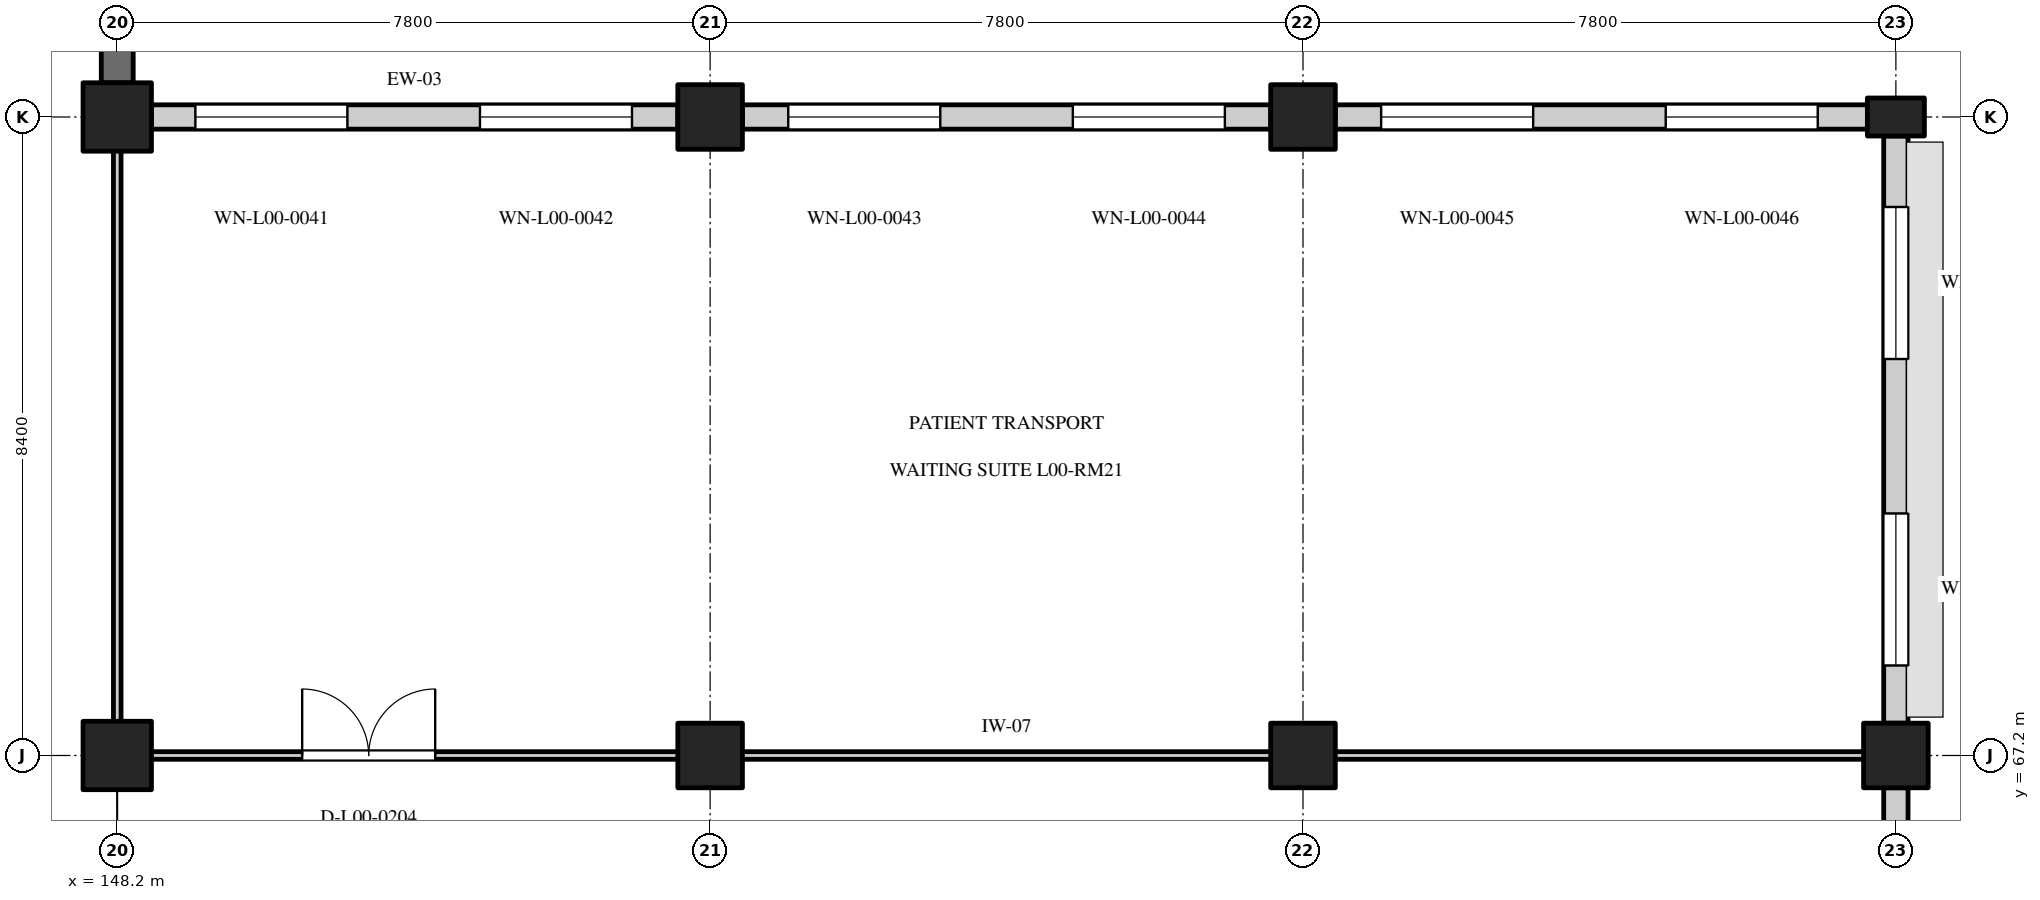
"""IFC4 building model, lengths in metres.
Left out: names, types, materials, properties, quantities, classifications, styles, units other than length and angle.
Written with IfcOpenShell. Run it as: python <this file> out.ifc"""

import sys

from ifc_helpers import new_model, si_unit, direction, frame, frame_2d, origin, origin_2d, place, context, subcontext, project, spatial, rectangle, extrude, element, fill, save


model = new_model("IFC4")
c1 = context("Model", 3, precision=1e-05, world=origin(), true_north=direction((0.0, 1.0)))
c2 = subcontext(c1, "Body", "Model", "MODEL_VIEW")
j1 = project(units=[si_unit("LENGTHUNIT", "METRE"), si_unit("PLANEANGLEUNIT", "RADIAN")], contexts=[c1])
p1 = place(None, origin())
s1 = spatial("IfcSite", under=j1, at=p1, CompositionType="ELEMENT")
p2 = place(p1, origin())
s2 = spatial("IfcBuilding", under=s1, at=p2, CompositionType="ELEMENT")
p3 = place(p2, origin())
s3 = spatial("IfcBuildingStorey", under=s2, at=p3, CompositionType="ELEMENT", Elevation=0.0)
for number, where, z_axis, x_axis in (
    (1, (148.2, 67.2, 0.0), (0.0, 0.0, 1.0), (1.0, 0.0, 0.0)),
    (2, (148.2, 75.6, 0.0), (0.0, 0.0, 1.0), (1.0, 0.0, 0.0)),
):
    element("IfcColumn", number, at=place(p3, frame(where, z_axis=z_axis, x_axis=x_axis)), inside=s3, PredefinedType="COLUMN", context=c2, shape_type="SweptSolid", body=[
        extrude(rectangle(XDim=0.9, YDim=0.9, at=origin_2d()), origin(), (0.0, 0.0, 1.0), 4.8),
    ])
for number, where, z_axis, x_axis in (
    (3, (156.0, 67.2, 0.0), (0.0, 0.0, 1.0), (1.0, 0.0, 0.0)),
    (4, (156.0, 75.6, 0.0), (0.0, 0.0, 1.0), (1.0, 0.0, 0.0)),
    (5, (163.8, 67.2, 0.0), (0.0, 0.0, 1.0), (1.0, 0.0, 0.0)),
    (6, (163.8, 75.6, 0.0), (0.0, 0.0, 1.0), (1.0, 0.0, 0.0)),
    (7, (171.6, 67.2, 0.0), (0.0, 0.0, 1.0), (1.0, 0.0, 0.0)),
):
    element("IfcColumn", number, at=place(p3, frame(where, z_axis=z_axis, x_axis=x_axis)), inside=s3, PredefinedType="COLUMN", context=c2, shape_type="SweptSolid", body=[
        extrude(rectangle(XDim=0.85, YDim=0.85, at=origin_2d()), origin(), (0.0, 0.0, 1.0), 4.8),
    ])
p4 = place(p3, frame((171.6, 75.6, 0.0), z_axis=(0.0, 0.0, 1.0), x_axis=(0.0, 1.0, 0.0)))
e8 = element("IfcColumn", 8, at=p4, inside=s3, PredefinedType="PILASTER", context=c2, shape_type="SweptSolid", body=[
    extrude(rectangle(XDim=0.5, YDim=0.75, at=origin_2d()), origin(), (0.0, 0.0, 1.0), 4.8),
])
p5 = place(p3, frame((148.65, 75.6, 0.0), z_axis=(0.0, 0.0, 1.0), x_axis=(1.0, 0.0, 0.0)))
e9 = element("IfcWall", 9, at=p5, inside=s3, PredefinedType="STANDARD", context=c2, shape_type="SweptSolid", body=[
    extrude(rectangle(XDim=6.925, YDim=0.32, at=frame_2d((3.462, 0.0))), origin(), (0.0, 0.0, 1.0), 3.75),
])
p6 = place(p5, frame((0.578, 0.0, 0.75)))
e10 = element("IfcOpeningElement", 10, at=p6, cuts=e9, PredefinedType="OPENING", context=c2, shape_type="SweptSolid", body=[
    extrude(rectangle(XDim=2.0, YDim=1.75, at=frame_2d((1.0, 0.875))), frame((0.0, 0.172, 0.0), z_axis=(0.0, -1.0, 0.0), x_axis=(1.0, 0.0, 0.0)), (0.0, 0.0, 1.0), 0.344),
])
p7 = place(p5, frame((4.322, 0.0, 0.75)))
e11 = element("IfcOpeningElement", 11, at=p7, cuts=e9, PredefinedType="OPENING", context=c2, shape_type="SweptSolid", body=[
    extrude(rectangle(XDim=2.0, YDim=1.75, at=frame_2d((1.0, 0.875))), frame((0.0, 0.172, 0.0), z_axis=(0.0, -1.0, 0.0), x_axis=(1.0, 0.0, 0.0)), (0.0, 0.0, 1.0), 0.344),
])
p8 = place(p3, frame((156.425, 75.6, 0.0), z_axis=(0.0, 0.0, 1.0), x_axis=(1.0, 0.0, 0.0)))
e12 = element("IfcWall", 12, at=p8, inside=s3, PredefinedType="STANDARD", context=c2, shape_type="SweptSolid", body=[
    extrude(rectangle(XDim=6.95, YDim=0.32, at=frame_2d((3.475, 0.0))), origin(), (0.0, 0.0, 1.0), 3.75),
])
p9 = place(p8, frame((0.603, 0.0, 0.75)))
e13 = element("IfcOpeningElement", 13, at=p9, cuts=e12, PredefinedType="OPENING", context=c2, shape_type="SweptSolid", body=[
    extrude(rectangle(XDim=2.0, YDim=1.65, at=frame_2d((1.0, 0.825))), frame((0.0, 0.172, 0.0), z_axis=(0.0, -1.0, 0.0), x_axis=(1.0, 0.0, 0.0)), (0.0, 0.0, 1.0), 0.344),
])
p10 = place(p8, frame((4.347, 0.0, 0.75)))
e14 = element("IfcOpeningElement", 14, at=p10, cuts=e12, PredefinedType="OPENING", context=c2, shape_type="SweptSolid", body=[
    extrude(rectangle(XDim=2.0, YDim=1.65, at=frame_2d((1.0, 0.825))), frame((0.0, 0.172, 0.0), z_axis=(0.0, -1.0, 0.0), x_axis=(1.0, 0.0, 0.0)), (0.0, 0.0, 1.0), 0.344),
])
p11 = place(p3, frame((164.225, 75.6, 0.0), z_axis=(0.0, 0.0, 1.0), x_axis=(1.0, 0.0, 0.0)))
e15 = element("IfcWall", 15, at=p11, inside=s3, PredefinedType="STANDARD", context=c2, shape_type="SweptSolid", body=[
    extrude(rectangle(XDim=7.0, YDim=0.32, at=frame_2d((3.5, 0.0))), origin(), (0.0, 0.0, 1.0), 3.75),
])
p12 = place(p11, frame((0.603, 0.0, 0.75)))
e16 = element("IfcOpeningElement", 16, at=p12, cuts=e15, PredefinedType="OPENING", context=c2, shape_type="SweptSolid", body=[
    extrude(rectangle(XDim=2.0, YDim=1.55, at=frame_2d((1.0, 0.775))), frame((0.0, 0.172, 0.0), z_axis=(0.0, -1.0, 0.0), x_axis=(1.0, 0.0, 0.0)), (0.0, 0.0, 1.0), 0.344),
])
p13 = place(p11, frame((4.347, 0.0, 0.75)))
e17 = element("IfcOpeningElement", 17, at=p13, cuts=e15, PredefinedType="OPENING", context=c2, shape_type="SweptSolid", body=[
    extrude(rectangle(XDim=2.0, YDim=1.55, at=frame_2d((1.0, 0.775))), frame((0.0, 0.172, 0.0), z_axis=(0.0, -1.0, 0.0), x_axis=(1.0, 0.0, 0.0)), (0.0, 0.0, 1.0), 0.344),
])
p14 = place(p3, frame((148.2, 76.05, 0.0), z_axis=(0.0, 0.0, 1.0), x_axis=(0.0, 1.0, 0.0)))
e18 = element("IfcWall", 18, at=p14, inside=s3, PredefinedType="SOLIDWALL", context=c2, shape_type="SweptSolid", body=[
    extrude(rectangle(XDim=7.5, YDim=0.42, at=frame_2d((3.75, 0.0))), origin(), (0.0, 0.0, 1.0), 3.75),
])
p15 = place(p14, frame((3.3, 0.0, 0.75)))
e19 = element("IfcOpeningElement", 19, at=p15, cuts=e18, PredefinedType="OPENING", context=c2, shape_type="SweptSolid", body=[
    extrude(rectangle(XDim=0.9, YDim=1.3, at=frame_2d((0.45, 0.65))), frame((0.0, 0.222, 0.0), z_axis=(0.0, -1.0, 0.0), x_axis=(1.0, 0.0, 0.0)), (0.0, 0.0, 1.0), 0.444),
])
p16 = place(p3, frame((171.6, 59.05, 0.0), z_axis=(0.0, 0.0, 1.0), x_axis=(0.0, 1.0, 0.0)))
e20 = element("IfcWall", 20, at=p16, inside=s3, PredefinedType="STANDARD", context=c2, shape_type="SweptSolid", body=[
    extrude(rectangle(XDim=7.725, YDim=0.32, at=frame_2d((3.862, 0.0))), origin(), (0.0, 0.0, 1.0), 3.75),
])
p17 = place(p16, frame((2.913, 0.0, 0.0)))
e21 = element("IfcOpeningElement", 21, at=p17, cuts=e20, PredefinedType="OPENING", context=c2, shape_type="SweptSolid", body=[
    extrude(rectangle(XDim=1.9, YDim=2.25, at=frame_2d((0.95, 1.125))), frame((0.0, 0.172, 0.0), z_axis=(0.0, -1.0, 0.0), x_axis=(1.0, 0.0, 0.0)), (0.0, 0.0, 1.0), 0.344),
])
p18 = place(p3, frame((171.6, 67.625, 0.0), z_axis=(0.0, 0.0, 1.0), x_axis=(0.0, 1.0, 0.0)))
e22 = element("IfcWall", 22, at=p18, inside=s3, PredefinedType="STANDARD", context=c2, shape_type="SweptSolid", body=[
    extrude(rectangle(XDim=7.725, YDim=0.32, at=frame_2d((3.863, 0.0))), origin(), (0.0, 0.0, 1.0), 3.75),
])
p19 = place(p18, frame((0.759, 0.0, 0.75)))
e23 = element("IfcOpeningElement", 23, at=p19, cuts=e22, PredefinedType="OPENING", context=c2, shape_type="SweptSolid", body=[
    extrude(rectangle(XDim=2.0, YDim=1.55, at=frame_2d((1.0, 0.775))), frame((0.0, 0.172, 0.0), z_axis=(0.0, -1.0, 0.0), x_axis=(1.0, 0.0, 0.0)), (0.0, 0.0, 1.0), 0.344),
])
p20 = place(p18, frame((4.791, 0.0, 0.75)))
e24 = element("IfcOpeningElement", 24, at=p20, cuts=e22, PredefinedType="OPENING", context=c2, shape_type="SweptSolid", body=[
    extrude(rectangle(XDim=2.0, YDim=1.55, at=frame_2d((1.0, 0.775))), frame((0.0, 0.172, 0.0), z_axis=(0.0, -1.0, 0.0), x_axis=(1.0, 0.0, 0.0)), (0.0, 0.0, 1.0), 0.344),
])
p21 = place(p3, frame((148.285, 67.2, 0.0), z_axis=(0.0, 0.0, 1.0), x_axis=(1.0, 0.0, 0.0)))
e25 = element("IfcWall", 25, at=p21, inside=s3, PredefinedType="PARTITIONING", context=c2, shape_type="SweptSolid", body=[
    extrude(rectangle(XDim=23.23, YDim=0.1, at=frame_2d((11.615, 0.0))), origin(), (0.0, 0.0, 1.0), 4.43),
])
p22 = place(p21, frame((2.348, 0.0, 0.0)))
e26 = element("IfcOpeningElement", 26, at=p22, cuts=e25, PredefinedType="OPENING", context=c2, shape_type="SweptSolid", body=[
    extrude(rectangle(XDim=1.75, YDim=2.3, at=frame_2d((0.875, 1.15))), frame((0.0, 0.062, 0.0), z_axis=(0.0, -1.0, 0.0), x_axis=(1.0, 0.0, 0.0)), (0.0, 0.0, 1.0), 0.124),
])
for number, where, z_axis, x_axis in (
    (27, (155.615, 75.6, 0.0), (0.0, 0.0, 1.0), (1.0, 0.0, 0.0)),
    (28, (163.415, 75.6, 0.0), (0.0, 0.0, 1.0), (1.0, 0.0, 0.0)),
):
    element("IfcWall", number, at=place(p3, frame(where, z_axis=z_axis, x_axis=x_axis)), inside=s3, PredefinedType="PARTITIONING", context=c2, shape_type="SweptSolid", body=[
        extrude(rectangle(XDim=0.77, YDim=0.1, at=frame_2d((0.385, 0.0))), origin(), (0.0, 0.0, 1.0), 3.7),
    ])
p23 = place(p3, frame((148.2, 67.285, 0.0), z_axis=(0.0, 0.0, 1.0), x_axis=(0.0, 1.0, 0.0)))
e29 = element("IfcWall", 29, at=p23, inside=s3, PredefinedType="PARTITIONING", context=c2, shape_type="SweptSolid", body=[
    extrude(rectangle(XDim=8.23, YDim=0.1, at=frame_2d((4.115, 0.0))), origin(), (0.0, 0.0, 1.0), 3.7),
])
p24 = place(p6, origin())
e30 = element("IfcWindow", 30, at=p24, inside=s3, PartitioningType="DOUBLE_PANEL_VERTICAL", PredefinedType="WINDOW", context=c2, shape_type="SweptSolid", body=[
    extrude(rectangle(XDim=2.0, YDim=1.75, at=frame_2d((1.0, 0.875))), frame((0.0, 0.03, 0.0), z_axis=(0.0, -1.0, 0.0), x_axis=(1.0, 0.0, 0.0)), (0.0, 0.0, 1.0), 0.06),
])
fill(e10, e30)
p25 = place(p7, origin())
e31 = element("IfcWindow", 31, at=p25, inside=s3, PartitioningType="DOUBLE_PANEL_VERTICAL", PredefinedType="WINDOW", context=c2, shape_type="SweptSolid", body=[
    extrude(rectangle(XDim=2.0, YDim=1.75, at=frame_2d((1.0, 0.875))), frame((0.0, 0.03, 0.0), z_axis=(0.0, -1.0, 0.0), x_axis=(1.0, 0.0, 0.0)), (0.0, 0.0, 1.0), 0.06),
])
fill(e11, e31)
p26 = place(p9, origin())
e32 = element("IfcWindow", 32, at=p26, inside=s3, PartitioningType="DOUBLE_PANEL_VERTICAL", PredefinedType="WINDOW", context=c2, shape_type="SweptSolid", body=[
    extrude(rectangle(XDim=2.0, YDim=1.65, at=frame_2d((1.0, 0.825))), frame((0.0, 0.03, 0.0), z_axis=(0.0, -1.0, 0.0), x_axis=(1.0, 0.0, 0.0)), (0.0, 0.0, 1.0), 0.06),
])
fill(e13, e32)
p27 = place(p10, origin())
e33 = element("IfcWindow", 33, at=p27, inside=s3, PartitioningType="DOUBLE_PANEL_VERTICAL", PredefinedType="WINDOW", context=c2, shape_type="SweptSolid", body=[
    extrude(rectangle(XDim=2.0, YDim=1.65, at=frame_2d((1.0, 0.825))), frame((0.0, 0.03, 0.0), z_axis=(0.0, -1.0, 0.0), x_axis=(1.0, 0.0, 0.0)), (0.0, 0.0, 1.0), 0.06),
])
fill(e14, e33)
p28 = place(p12, origin())
e34 = element("IfcWindow", 34, at=p28, inside=s3, PartitioningType="DOUBLE_PANEL_VERTICAL", PredefinedType="WINDOW", context=c2, shape_type="SweptSolid", body=[
    extrude(rectangle(XDim=2.0, YDim=1.55, at=frame_2d((1.0, 0.775))), frame((0.0, 0.03, 0.0), z_axis=(0.0, -1.0, 0.0), x_axis=(1.0, 0.0, 0.0)), (0.0, 0.0, 1.0), 0.06),
])
fill(e16, e34)
p29 = place(p13, origin())
e35 = element("IfcWindow", 35, at=p29, inside=s3, PartitioningType="DOUBLE_PANEL_VERTICAL", PredefinedType="WINDOW", context=c2, shape_type="SweptSolid", body=[
    extrude(rectangle(XDim=2.0, YDim=1.55, at=frame_2d((1.0, 0.775))), frame((0.0, 0.03, 0.0), z_axis=(0.0, -1.0, 0.0), x_axis=(1.0, 0.0, 0.0)), (0.0, 0.0, 1.0), 0.06),
])
fill(e17, e35)
p30 = place(p19, origin())
e36 = element("IfcWindow", 36, at=p30, inside=s3, PartitioningType="DOUBLE_PANEL_VERTICAL", PredefinedType="WINDOW", context=c2, shape_type="SweptSolid", body=[
    extrude(rectangle(XDim=2.0, YDim=1.55, at=frame_2d((1.0, 0.775))), frame((0.0, 0.03, 0.0), z_axis=(0.0, -1.0, 0.0), x_axis=(1.0, 0.0, 0.0)), (0.0, 0.0, 1.0), 0.06),
])
fill(e23, e36)
p31 = place(p20, origin())
e37 = element("IfcWindow", 37, at=p31, inside=s3, PartitioningType="DOUBLE_PANEL_VERTICAL", PredefinedType="WINDOW", context=c2, shape_type="SweptSolid", body=[
    extrude(rectangle(XDim=2.0, YDim=1.55, at=frame_2d((1.0, 0.775))), frame((0.0, 0.03, 0.0), z_axis=(0.0, -1.0, 0.0), x_axis=(1.0, 0.0, 0.0)), (0.0, 0.0, 1.0), 0.06),
])
fill(e24, e37)
p32 = place(p22, origin())
e38 = element("IfcDoor", 38, at=p32, inside=s3, OperationType="DOUBLE_DOOR_SINGLE_SWING", PredefinedType="DOOR", context=c2, shape_type="SweptSolid", body=[
    extrude(rectangle(XDim=1.75, YDim=2.3, at=frame_2d((0.875, 1.15))), frame((0.0, 0.025, 0.0), z_axis=(0.0, -1.0, 0.0), x_axis=(1.0, 0.0, 0.0)), (0.0, 0.0, 1.0), 0.05),
])
fill(e26, e38)
save(model, sys.argv[1])
